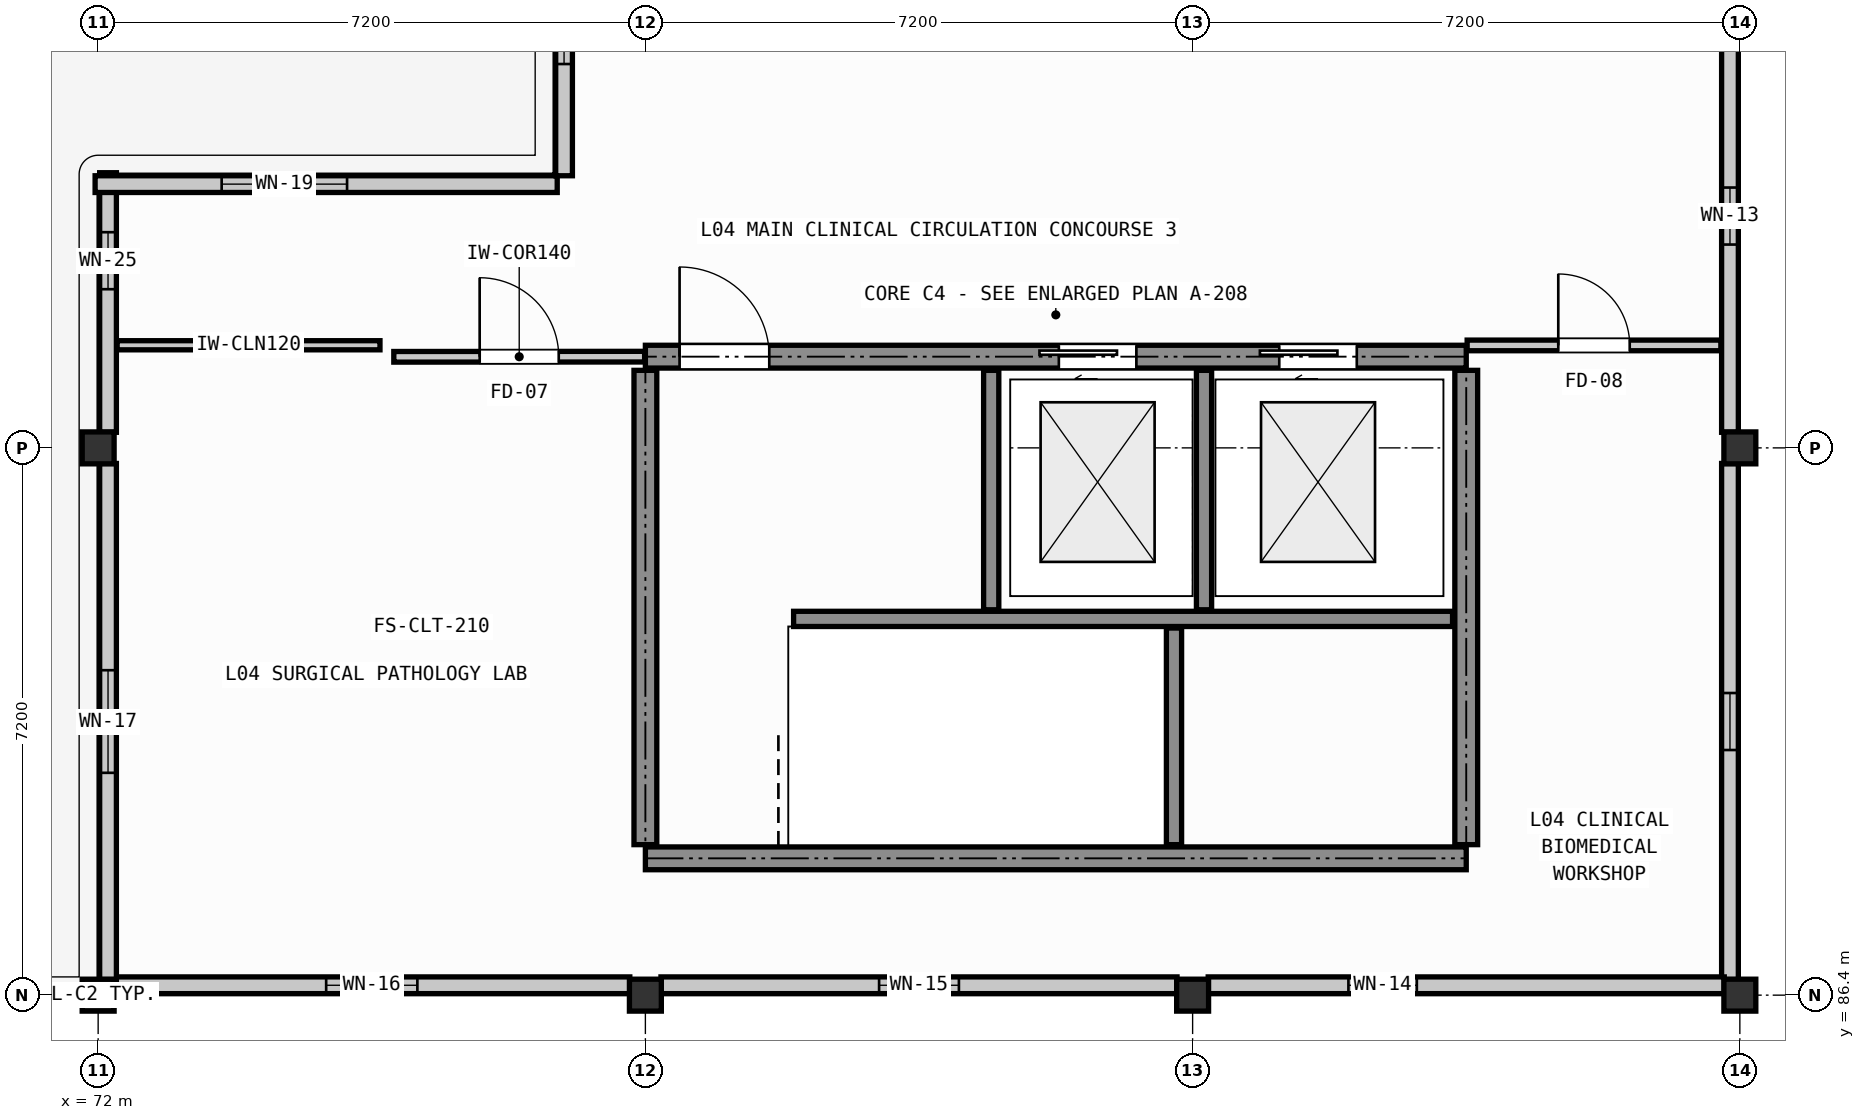
"""IFC4 building model, lengths in metres.
Left out: names, types, materials, properties, quantities, classifications, styles, units other than length and angle.
Written with IfcOpenShell. Run it as: python <this file> out.ifc"""

import sys

from ifc_helpers import new_model, si_unit, direction, frame, frame_2d, origin, origin_2d, place, context, subcontext, project, spatial, rectangle, extrude, element, fill, save


model = new_model("IFC4")
c1 = context("Model", 3, precision=1e-05, world=origin(), true_north=direction((0.0, 1.0)))
c2 = subcontext(c1, "Body", "Model", "MODEL_VIEW")
j1 = project(units=[si_unit("LENGTHUNIT", "METRE"), si_unit("PLANEANGLEUNIT", "RADIAN")], contexts=[c1])
p1 = place(None, origin())
s1 = spatial("IfcSite", under=j1, at=p1, CompositionType="ELEMENT")
p2 = place(p1, origin())
s2 = spatial("IfcBuilding", under=s1, at=p2, CompositionType="ELEMENT")
p3 = place(p2, frame((0.0, 0.0, 13.5)))
s3 = spatial("IfcBuildingStorey", under=s2, at=p3, CompositionType="ELEMENT", Elevation=13.5)
for number, where, z_axis, x_axis in (
    (1, (72.0, 86.4, 0.0), (0.0, 0.0, 1.0), (1.0, 0.0, 0.0)),
    (2, (72.0, 93.6, 0.0), (0.0, 0.0, 1.0), (1.0, 0.0, 0.0)),
    (3, (79.2, 86.4, 0.0), (0.0, 0.0, 1.0), (1.0, 0.0, 0.0)),
    (4, (86.4, 86.4, 0.0), (0.0, 0.0, 1.0), (1.0, 0.0, 0.0)),
    (5, (93.6, 86.4, 0.0), (0.0, 0.0, 1.0), (1.0, 0.0, 0.0)),
    (6, (93.6, 93.6, 0.0), (0.0, 0.0, 1.0), (1.0, 0.0, 0.0)),
):
    element("IfcColumn", number, at=place(p3, frame(where, z_axis=z_axis, x_axis=x_axis)), inside=s3, PredefinedType="COLUMN", context=c2, shape_type="SweptSolid", body=[
        extrude(rectangle(XDim=0.42, YDim=0.42, at=origin_2d()), origin(), (0.0, 0.0, 1.0), 3.99),
    ])
p4 = place(p3, frame((93.47, 100.595, 0.0), z_axis=(0.0, 0.0, 1.0), x_axis=(0.0, -1.0, 0.0)))
e7 = element("IfcWall", 7, at=p4, inside=s3, PredefinedType="SOLIDWALL", context=c2, shape_type="SweptSolid", body=[
    extrude(rectangle(XDim=6.79, YDim=0.22, at=frame_2d((3.395, 0.0))), origin(), (0.0, 0.0, 1.0), 3.27),
])
p5 = place(p4, frame((3.57, 0.0, 1.5)))
e8 = element("IfcOpeningElement", 8, at=p5, cuts=e7, PredefinedType="OPENING", context=c2, shape_type="SweptSolid", body=[
    extrude(rectangle(XDim=0.75, YDim=0.95, at=frame_2d((0.375, 0.475))), frame((0.0, 0.12, 0.0), z_axis=(0.0, -1.0, 0.0), x_axis=(1.0, 0.0, 0.0)), (0.0, 0.0, 1.0), 0.24),
])
p6 = place(p3, frame((93.47, 93.395, 0.0), z_axis=(0.0, 0.0, 1.0), x_axis=(0.0, -1.0, 0.0)))
e9 = element("IfcWall", 9, at=p6, inside=s3, PredefinedType="SOLIDWALL", context=c2, shape_type="SweptSolid", body=[
    extrude(rectangle(XDim=6.79, YDim=0.22, at=frame_2d((3.395, 0.0))), origin(), (0.0, 0.0, 1.0), 3.27),
])
p7 = place(p6, frame((3.02, 0.0, 1.5)))
e10 = element("IfcOpeningElement", 10, at=p7, cuts=e9, PredefinedType="OPENING", context=c2, shape_type="SweptSolid", body=[
    extrude(rectangle(XDim=0.75, YDim=0.95, at=frame_2d((0.375, 0.475))), frame((0.0, 0.12, 0.0), z_axis=(0.0, -1.0, 0.0), x_axis=(1.0, 0.0, 0.0)), (0.0, 0.0, 1.0), 0.24),
])
p8 = place(p3, frame((93.395, 86.53, 0.0), z_axis=(0.0, 0.0, 1.0), x_axis=(-1.0, 0.0, 0.0)))
e11 = element("IfcWall", 11, at=p8, inside=s3, PredefinedType="SOLIDWALL", context=c2, shape_type="SweptSolid", body=[
    extrude(rectangle(XDim=6.79, YDim=0.22, at=frame_2d((3.395, 0.0))), origin(), (0.0, 0.0, 1.0), 3.27),
])
p9 = place(p8, frame((4.045, 0.0, 1.5)))
e12 = element("IfcOpeningElement", 12, at=p9, cuts=e11, PredefinedType="OPENING", context=c2, shape_type="SweptSolid", body=[
    extrude(rectangle(XDim=0.9, YDim=0.95, at=frame_2d((0.45, 0.475))), frame((0.0, 0.12, 0.0), z_axis=(0.0, -1.0, 0.0), x_axis=(1.0, 0.0, 0.0)), (0.0, 0.0, 1.0), 0.24),
])
p10 = place(p3, frame((86.195, 86.53, 0.0), z_axis=(0.0, 0.0, 1.0), x_axis=(-1.0, 0.0, 0.0)))
e13 = element("IfcWall", 13, at=p10, inside=s3, PredefinedType="SOLIDWALL", context=c2, shape_type="SweptSolid", body=[
    extrude(rectangle(XDim=6.79, YDim=0.22, at=frame_2d((3.395, 0.0))), origin(), (0.0, 0.0, 1.0), 3.27),
])
p11 = place(p10, frame((2.87, 0.0, 1.5)))
e14 = element("IfcOpeningElement", 14, at=p11, cuts=e13, PredefinedType="OPENING", context=c2, shape_type="SweptSolid", body=[
    extrude(rectangle(XDim=1.05, YDim=0.95, at=frame_2d((0.525, 0.475))), frame((0.0, 0.12, 0.0), z_axis=(0.0, -1.0, 0.0), x_axis=(1.0, 0.0, 0.0)), (0.0, 0.0, 1.0), 0.24),
])
p12 = place(p3, frame((78.995, 86.53, 0.0), z_axis=(0.0, 0.0, 1.0), x_axis=(-1.0, 0.0, 0.0)))
e15 = element("IfcWall", 15, at=p12, inside=s3, PredefinedType="SOLIDWALL", context=c2, shape_type="SweptSolid", body=[
    extrude(rectangle(XDim=6.79, YDim=0.22, at=frame_2d((3.395, 0.0))), origin(), (0.0, 0.0, 1.0), 3.27),
])
p13 = place(p12, frame((2.795, 0.0, 1.5)))
e16 = element("IfcOpeningElement", 16, at=p13, cuts=e15, PredefinedType="OPENING", context=c2, shape_type="SweptSolid", body=[
    extrude(rectangle(XDim=1.2, YDim=0.95, at=frame_2d((0.6, 0.475))), frame((0.0, 0.12, 0.0), z_axis=(0.0, -1.0, 0.0), x_axis=(1.0, 0.0, 0.0)), (0.0, 0.0, 1.0), 0.24),
])
p14 = place(p3, frame((72.13, 86.605, 0.0), z_axis=(0.0, 0.0, 1.0), x_axis=(0.0, 1.0, 0.0)))
e17 = element("IfcWall", 17, at=p14, inside=s3, PredefinedType="SOLIDWALL", context=c2, shape_type="SweptSolid", body=[
    extrude(rectangle(XDim=6.79, YDim=0.22, at=frame_2d((3.395, 0.0))), origin(), (0.0, 0.0, 1.0), 3.27),
])
p15 = place(p14, frame((2.72, 0.0, 1.5)))
e18 = element("IfcOpeningElement", 18, at=p15, cuts=e17, PredefinedType="OPENING", context=c2, shape_type="SweptSolid", body=[
    extrude(rectangle(XDim=1.35, YDim=0.95, at=frame_2d((0.675, 0.475))), frame((0.0, 0.12, 0.0), z_axis=(0.0, -1.0, 0.0), x_axis=(1.0, 0.0, 0.0)), (0.0, 0.0, 1.0), 0.24),
])
p16 = place(p3, frame((72.13, 93.805, 0.0), z_axis=(0.0, 0.0, 1.0), x_axis=(0.0, 1.0, 0.0)))
e19 = element("IfcWall", 19, at=p16, inside=s3, PredefinedType="SOLIDWALL", context=c2, shape_type="SweptSolid", body=[
    extrude(rectangle(XDim=3.415, YDim=0.22, at=frame_2d((1.708, 0.0))), origin(), (0.0, 0.0, 1.0), 3.97),
])
p17 = place(p16, frame((1.883, 0.0, 0.95)))
e20 = element("IfcOpeningElement", 20, at=p17, cuts=e19, PredefinedType="OPENING", context=c2, shape_type="SweptSolid", body=[
    extrude(rectangle(XDim=0.75, YDim=1.25, at=frame_2d((0.375, 0.625))), frame((0.0, 0.12, 0.0), z_axis=(0.0, -1.0, 0.0), x_axis=(1.0, 0.0, 0.0)), (0.0, 0.0, 1.0), 0.24),
])
p18 = place(p3, frame((71.96, 97.07, 0.0), z_axis=(0.0, 0.0, 1.0), x_axis=(1.0, 0.0, 0.0)))
e21 = element("IfcWall", 21, at=p18, inside=s3, PredefinedType="SOLIDWALL", context=c2, shape_type="SweptSolid", body=[
    extrude(rectangle(XDim=6.08, YDim=0.22, at=frame_2d((3.04, 0.0))), origin(), (0.0, 0.0, 1.0), 3.97),
])
p19 = place(p18, frame((1.665, 0.0, 1.5)))
e22 = element("IfcOpeningElement", 22, at=p19, cuts=e21, PredefinedType="OPENING", context=c2, shape_type="SweptSolid", body=[
    extrude(rectangle(XDim=1.65, YDim=0.95, at=frame_2d((0.825, 0.475))), frame((0.0, 0.12, 0.0), z_axis=(0.0, -1.0, 0.0), x_axis=(1.0, 0.0, 0.0)), (0.0, 0.0, 1.0), 0.24),
])
p20 = place(p3, frame((78.13, 97.18, 0.0), z_axis=(0.0, 0.0, 1.0), x_axis=(0.0, 1.0, 0.0)))
e23 = element("IfcWall", 23, at=p20, inside=s3, PredefinedType="SOLIDWALL", context=c2, shape_type="SweptSolid", body=[
    extrude(rectangle(XDim=3.64, YDim=0.22, at=frame_2d((1.82, 0.0))), origin(), (0.0, 0.0, 1.0), 3.97),
])
p21 = place(p20, frame((1.47, 0.0, 1.5)))
e24 = element("IfcOpeningElement", 24, at=p21, cuts=e23, PredefinedType="OPENING", context=c2, shape_type="SweptSolid", body=[
    extrude(rectangle(XDim=1.8, YDim=0.95, at=frame_2d((0.9, 0.475))), frame((0.0, 0.12, 0.0), z_axis=(0.0, -1.0, 0.0), x_axis=(1.0, 0.0, 0.0)), (0.0, 0.0, 1.0), 0.24),
])
p22 = place(p3, frame((79.2, 88.2, 0.0), z_axis=(0.0, 0.0, 1.0), x_axis=(1.0, 0.0, 0.0)))
e25 = element("IfcWall", 25, at=p22, inside=s3, PredefinedType="SHEAR", context=c2, shape_type="SweptSolid", body=[
    extrude(rectangle(XDim=10.8, YDim=0.3, at=frame_2d((5.4, 0.0))), origin(), (0.0, 0.0, 1.0), 4.2),
])
p23 = place(p3, frame((79.2, 94.8, 0.0), z_axis=(0.0, 0.0, 1.0), x_axis=(1.0, 0.0, 0.0)))
e26 = element("IfcWall", 26, at=p23, inside=s3, PredefinedType="SHEAR", context=c2, shape_type="SweptSolid", body=[
    extrude(rectangle(XDim=10.8, YDim=0.3, at=frame_2d((5.4, 0.0))), origin(), (0.0, 0.0, 1.0), 4.2),
])
p24 = place(p23, frame((0.45, 0.0, 0.0)))
e27 = element("IfcOpeningElement", 27, at=p24, cuts=e26, PredefinedType="OPENING", context=c2, shape_type="SweptSolid", body=[
    extrude(rectangle(XDim=1.18, YDim=2.16, at=frame_2d((0.59, 1.08))), frame((0.0, 0.16, 0.0), z_axis=(0.0, -1.0, 0.0), x_axis=(1.0, 0.0, 0.0)), (0.0, 0.0, 1.0), 0.32),
])
p25 = place(p23, frame((5.44, 0.0, 0.0)))
e28 = element("IfcOpeningElement", 28, at=p25, cuts=e26, PredefinedType="OPENING", context=c2, shape_type="SweptSolid", body=[
    extrude(rectangle(XDim=1.02, YDim=2.12, at=frame_2d((0.51, 1.06))), frame((0.0, 0.16, 0.0), z_axis=(0.0, -1.0, 0.0), x_axis=(1.0, 0.0, 0.0)), (0.0, 0.0, 1.0), 0.32),
])
p26 = place(p23, frame((8.34, 0.0, 0.0)))
e29 = element("IfcOpeningElement", 29, at=p26, cuts=e26, PredefinedType="OPENING", context=c2, shape_type="SweptSolid", body=[
    extrude(rectangle(XDim=1.02, YDim=2.12, at=frame_2d((0.51, 1.06))), frame((0.0, 0.16, 0.0), z_axis=(0.0, -1.0, 0.0), x_axis=(1.0, 0.0, 0.0)), (0.0, 0.0, 1.0), 0.32),
])
for number, where, z_axis, x_axis in (
    (30, (79.2, 88.38, 0.0), (0.0, 0.0, 1.0), (0.0, 1.0, 0.0)),
    (31, (90.0, 88.38, 0.0), (0.0, 0.0, 1.0), (0.0, 1.0, 0.0)),
):
    element("IfcWall", number, at=place(p3, frame(where, z_axis=z_axis, x_axis=x_axis)), inside=s3, PredefinedType="SHEAR", context=c2, shape_type="SweptSolid", body=[
        extrude(rectangle(XDim=6.24, YDim=0.3, at=frame_2d((3.12, 0.0))), origin(), (0.0, 0.0, 1.0), 4.2),
    ])
p27 = place(p3, frame((81.15, 91.35, 0.0), z_axis=(0.0, 0.0, 1.0), x_axis=(1.0, 0.0, 0.0)))
e32 = element("IfcWall", 32, at=p27, inside=s3, PredefinedType="SHEAR", context=c2, shape_type="SweptSolid", body=[
    extrude(rectangle(XDim=8.67, YDim=0.2, at=frame_2d((4.335, 0.0))), origin(), (0.0, 0.0, 1.0), 4.2),
])
p28 = place(p3, frame((86.155, 88.38, 0.0), z_axis=(0.0, 0.0, 1.0), x_axis=(0.0, 1.0, 0.0)))
e33 = element("IfcWall", 33, at=p28, inside=s3, PredefinedType="SHEAR", context=c2, shape_type="SweptSolid", body=[
    extrude(rectangle(XDim=2.85, YDim=0.2, at=frame_2d((1.425, 0.0))), origin(), (0.0, 0.0, 1.0), 4.2),
])
for number, where, z_axis, x_axis in (
    (34, (83.75, 91.47, 0.0), (0.0, 0.0, 1.0), (0.0, 1.0, 0.0)),
    (35, (86.55, 91.47, 0.0), (0.0, 0.0, 1.0), (0.0, 1.0, 0.0)),
):
    element("IfcWall", number, at=place(p3, frame(where, z_axis=z_axis, x_axis=x_axis)), inside=s3, PredefinedType="SHEAR", context=c2, shape_type="SweptSolid", body=[
        extrude(rectangle(XDim=3.15, YDim=0.2, at=frame_2d((1.575, 0.0))), origin(), (0.0, 0.0, 1.0), 4.2),
    ])
p29 = place(p3, frame((72.25, 94.95, 0.0), z_axis=(0.0, 0.0, 1.0), x_axis=(1.0, 0.0, 0.0)))
e36 = element("IfcWall", 36, at=p29, inside=s3, PredefinedType="PARTITIONING", context=c2, shape_type="SweptSolid", body=[
    extrude(rectangle(XDim=3.458, YDim=0.12, at=frame_2d((1.729, 0.0))), origin(), (0.0, 0.0, 1.0), 3.97),
])
p30 = place(p3, frame((75.89, 94.798, 0.0), z_axis=(0.0, 0.0, 1.0), x_axis=(0.999999824858, 0.0005918472, 0.0)))
e37 = element("IfcWall", 37, at=p30, inside=s3, PredefinedType="PARTITIONING", context=c2, shape_type="SweptSolid", body=[
    extrude(rectangle(XDim=3.3, YDim=0.14, at=frame_2d((1.65, 0.0))), origin(), (0.0, 0.0, 1.0), 3.97),
])
p31 = place(p30, frame((1.13, 0.0, 0.0)))
e38 = element("IfcOpeningElement", 38, at=p31, cuts=e37, PredefinedType="OPENING", context=c2, shape_type="SweptSolid", body=[
    extrude(rectangle(XDim=1.04, YDim=2.12, at=frame_2d((0.52, 1.06))), frame((0.0, 0.08, 0.0), z_axis=(0.0, -1.0, 0.0), x_axis=(1.0, 0.0, 0.0)), (0.0, 0.0, 1.0), 0.16),
])
p32 = place(p3, frame((90.012, 94.948, 0.0), z_axis=(0.0, 0.0, 1.0), x_axis=(1.0, 0.0, 0.0)))
e39 = element("IfcWall", 39, at=p32, inside=s3, PredefinedType="PARTITIONING", context=c2, shape_type="SweptSolid", body=[
    extrude(rectangle(XDim=3.338, YDim=0.14, at=frame_2d((1.669, 0.0))), origin(), (0.0, 0.0, 1.0), 3.35),
])
p33 = place(p32, frame((1.199, 0.0, 0.0)))
e40 = element("IfcOpeningElement", 40, at=p33, cuts=e39, PredefinedType="OPENING", context=c2, shape_type="SweptSolid", body=[
    extrude(rectangle(XDim=0.94, YDim=2.1, at=frame_2d((0.47, 1.05))), frame((0.0, 0.08, 0.0), z_axis=(0.0, -1.0, 0.0), x_axis=(1.0, 0.0, 0.0)), (0.0, 0.0, 1.0), 0.16),
])
p34 = place(p5, origin())
e41 = element("IfcWindow", 41, at=p34, inside=s3, PartitioningType="SINGLE_PANEL", PredefinedType="WINDOW", context=c2, shape_type="SweptSolid", body=[
    extrude(rectangle(XDim=0.75, YDim=0.95, at=frame_2d((0.375, 0.475))), frame((0.0, 0.03, 0.0), z_axis=(0.0, -1.0, 0.0), x_axis=(1.0, 0.0, 0.0)), (0.0, 0.0, 1.0), 0.06),
])
fill(e8, e41)
p35 = place(p7, origin())
e42 = element("IfcWindow", 42, at=p35, inside=s3, PartitioningType="SINGLE_PANEL", PredefinedType="WINDOW", context=c2, shape_type="SweptSolid", body=[
    extrude(rectangle(XDim=0.75, YDim=0.95, at=frame_2d((0.375, 0.475))), frame((0.0, 0.03, 0.0), z_axis=(0.0, -1.0, 0.0), x_axis=(1.0, 0.0, 0.0)), (0.0, 0.0, 1.0), 0.06),
])
fill(e10, e42)
p36 = place(p9, origin())
e43 = element("IfcWindow", 43, at=p36, inside=s3, PartitioningType="SINGLE_PANEL", PredefinedType="WINDOW", context=c2, shape_type="SweptSolid", body=[
    extrude(rectangle(XDim=0.9, YDim=0.95, at=frame_2d((0.45, 0.475))), frame((0.0, 0.03, 0.0), z_axis=(0.0, -1.0, 0.0), x_axis=(1.0, 0.0, 0.0)), (0.0, 0.0, 1.0), 0.06),
])
fill(e12, e43)
p37 = place(p11, origin())
e44 = element("IfcWindow", 44, at=p37, inside=s3, PartitioningType="SINGLE_PANEL", PredefinedType="WINDOW", context=c2, shape_type="SweptSolid", body=[
    extrude(rectangle(XDim=1.05, YDim=0.95, at=frame_2d((0.525, 0.475))), frame((0.0, 0.03, 0.0), z_axis=(0.0, -1.0, 0.0), x_axis=(1.0, 0.0, 0.0)), (0.0, 0.0, 1.0), 0.06),
])
fill(e14, e44)
p38 = place(p13, origin())
e45 = element("IfcWindow", 45, at=p38, inside=s3, PartitioningType="SINGLE_PANEL", PredefinedType="WINDOW", context=c2, shape_type="SweptSolid", body=[
    extrude(rectangle(XDim=1.2, YDim=0.95, at=frame_2d((0.6, 0.475))), frame((0.0, 0.03, 0.0), z_axis=(0.0, -1.0, 0.0), x_axis=(1.0, 0.0, 0.0)), (0.0, 0.0, 1.0), 0.06),
])
fill(e16, e45)
p39 = place(p15, origin())
e46 = element("IfcWindow", 46, at=p39, inside=s3, PartitioningType="SINGLE_PANEL", PredefinedType="WINDOW", context=c2, shape_type="SweptSolid", body=[
    extrude(rectangle(XDim=1.35, YDim=0.95, at=frame_2d((0.675, 0.475))), frame((0.0, 0.03, 0.0), z_axis=(0.0, -1.0, 0.0), x_axis=(1.0, 0.0, 0.0)), (0.0, 0.0, 1.0), 0.06),
])
fill(e18, e46)
p40 = place(p17, origin())
e47 = element("IfcWindow", 47, at=p40, inside=s3, PartitioningType="SINGLE_PANEL", PredefinedType="WINDOW", context=c2, shape_type="SweptSolid", body=[
    extrude(rectangle(XDim=0.75, YDim=1.25, at=frame_2d((0.375, 0.625))), frame((0.0, 0.03, 0.0), z_axis=(0.0, -1.0, 0.0), x_axis=(1.0, 0.0, 0.0)), (0.0, 0.0, 1.0), 0.06),
])
fill(e20, e47)
p41 = place(p19, origin())
e48 = element("IfcWindow", 48, at=p41, inside=s3, PartitioningType="SINGLE_PANEL", PredefinedType="WINDOW", context=c2, shape_type="SweptSolid", body=[
    extrude(rectangle(XDim=1.65, YDim=0.95, at=frame_2d((0.825, 0.475))), frame((0.0, 0.03, 0.0), z_axis=(0.0, -1.0, 0.0), x_axis=(1.0, 0.0, 0.0)), (0.0, 0.0, 1.0), 0.06),
])
fill(e22, e48)
p42 = place(p21, origin())
e49 = element("IfcWindow", 49, at=p42, inside=s3, PartitioningType="SINGLE_PANEL", PredefinedType="WINDOW", context=c2, shape_type="SweptSolid", body=[
    extrude(rectangle(XDim=1.8, YDim=0.95, at=frame_2d((0.9, 0.475))), frame((0.0, 0.03, 0.0), z_axis=(0.0, -1.0, 0.0), x_axis=(1.0, 0.0, 0.0)), (0.0, 0.0, 1.0), 0.06),
])
fill(e24, e49)
p43 = place(p24, origin())
e50 = element("IfcDoor", 50, at=p43, inside=s3, OperationType="SINGLE_SWING_LEFT", PredefinedType="DOOR", context=c2, shape_type="SweptSolid", body=[
    extrude(rectangle(XDim=1.18, YDim=2.16, at=frame_2d((0.59, 1.08))), frame((0.0, 0.025, 0.0), z_axis=(0.0, -1.0, 0.0), x_axis=(1.0, 0.0, 0.0)), (0.0, 0.0, 1.0), 0.05),
])
fill(e27, e50)
p44 = place(p25, origin())
e51 = element("IfcDoor", 51, at=p44, inside=s3, OperationType="SLIDING_TO_LEFT", PredefinedType="DOOR", context=c2, shape_type="SweptSolid", body=[
    extrude(rectangle(XDim=1.02, YDim=2.12, at=frame_2d((0.51, 1.06))), frame((0.0, 0.025, 0.0), z_axis=(0.0, -1.0, 0.0), x_axis=(1.0, 0.0, 0.0)), (0.0, 0.0, 1.0), 0.05),
])
fill(e28, e51)
p45 = place(p26, origin())
e52 = element("IfcDoor", 52, at=p45, inside=s3, OperationType="SLIDING_TO_LEFT", PredefinedType="DOOR", context=c2, shape_type="SweptSolid", body=[
    extrude(rectangle(XDim=1.02, YDim=2.12, at=frame_2d((0.51, 1.06))), frame((0.0, 0.025, 0.0), z_axis=(0.0, -1.0, 0.0), x_axis=(1.0, 0.0, 0.0)), (0.0, 0.0, 1.0), 0.05),
])
fill(e29, e52)
p46 = place(p31, origin())
e53 = element("IfcDoor", 53, at=p46, inside=s3, OperationType="SINGLE_SWING_LEFT", PredefinedType="DOOR", context=c2, shape_type="SweptSolid", body=[
    extrude(rectangle(XDim=1.04, YDim=2.12, at=frame_2d((0.52, 1.06))), frame((0.0, 0.025, 0.0), z_axis=(0.0, -1.0, 0.0), x_axis=(1.0, 0.0, 0.0)), (0.0, 0.0, 1.0), 0.05),
])
fill(e38, e53)
p47 = place(p33, origin())
e54 = element("IfcDoor", 54, at=p47, inside=s3, OperationType="SINGLE_SWING_RIGHT", PredefinedType="DOOR", context=c2, shape_type="SweptSolid", body=[
    extrude(rectangle(XDim=0.94, YDim=2.1, at=frame_2d((0.47, 1.05))), frame((0.0, 0.025, 0.0), z_axis=(0.0, -1.0, 0.0), x_axis=(1.0, 0.0, 0.0)), (0.0, 0.0, 1.0), 0.05),
])
fill(e40, e54)
save(model, sys.argv[1])
